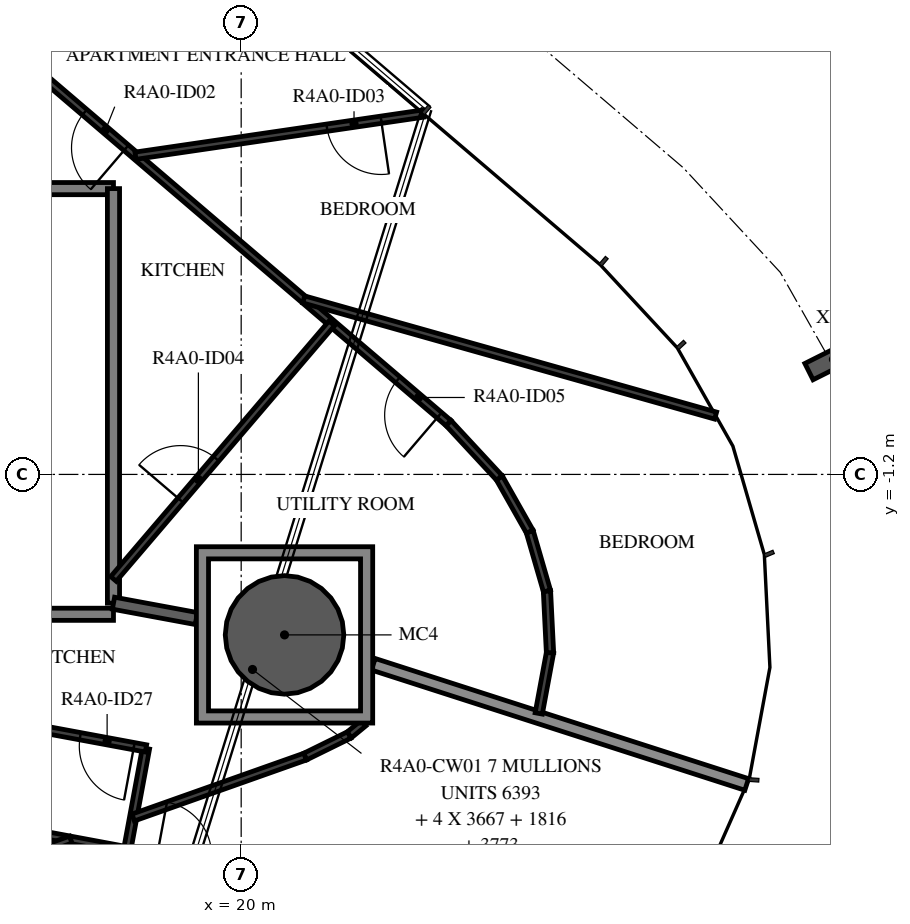
"""IFC4 building model, lengths in metres.
Left out: names, types, materials, properties, quantities, classifications, styles, units other than length and angle.
Written with IfcOpenShell. Run it as: python <this file> out.ifc"""

import sys

from ifc_helpers import new_model, si_unit, direction, frame, frame_2d, origin, origin_2d, place, context, subcontext, project, spatial, polyline, rectangle, hollow_circle, i_section, outline, extrude, element, fill, save


model = new_model("IFC4")
c1 = context("Model", 3, precision=1e-05, world=origin(), true_north=direction((0.0, 1.0)))
c2 = subcontext(c1, "Body", "Model", "MODEL_VIEW")
j1 = project(units=[si_unit("LENGTHUNIT", "METRE"), si_unit("PLANEANGLEUNIT", "RADIAN")], contexts=[c1])
p1 = place(None, origin())
s1 = spatial("IfcSite", under=j1, at=p1, CompositionType="ELEMENT")
p2 = place(p1, origin())
s2 = spatial("IfcBuilding", under=s1, at=p2, CompositionType="ELEMENT")
p3 = place(p2, frame((0.0, 0.0, 158.7)))
s3 = spatial("IfcBuildingStorey", under=s2, at=p3, CompositionType="ELEMENT", Elevation=158.7)
p4 = place(p3, frame((20.713, -3.839, -0.38), z_axis=(0.0, 0.0, 1.0), x_axis=(1.0, 0.0, 0.0)))
e1 = element("IfcColumn", 1, at=p4, inside=s3, PredefinedType="COLUMN", context=c2, shape_type="SweptSolid", body=[
    extrude(hollow_circle(Radius=0.975, WallThickness=0.045, at=origin_2d()), origin(), (0.0, 0.0, 1.0), 3.5),
])
p5 = place(p3, frame((29.74, 0.692, -0.38), z_axis=(0.0, 0.0, 1.0), x_axis=(0.448657012727, -0.893704025352, 0.0)))
e2 = element("IfcColumn", 2, at=p5, inside=s3, PredefinedType="COLUMN", context=c2, shape_type="SweptSolid", body=[
    extrude(i_section(OverallWidth=0.3, OverallDepth=0.9, WebThickness=0.019, FlangeThickness=0.035, FilletRadius=0.03, at=origin_2d()), origin(), (0.0, 0.0, 1.0), 3.5),
])
p6 = place(p3, frame((17.9, 3.5, 0.0), z_axis=(0.0, 0.0, 1.0), x_axis=(-1.0, 0.0, 0.0)))
e3 = element("IfcWall", 3, at=p6, inside=s3, PredefinedType="STANDARD", context=c2, shape_type="SweptSolid", body=[
    extrude(rectangle(XDim=4.924, YDim=0.2, at=frame_2d((2.462, 0.0))), origin(), (0.0, 0.0, 1.0), 3.12),
])
p7 = place(p3, frame((17.9, -3.318, 0.0), z_axis=(0.0, 0.0, 1.0), x_axis=(0.0, 1.0, 0.0)))
e4 = element("IfcWall", 4, at=p7, inside=s3, PredefinedType="STANDARD", context=c2, shape_type="SweptSolid", body=[
    extrude(rectangle(XDim=6.818, YDim=0.2, at=frame_2d((3.409, 0.0))), origin(), (0.0, 0.0, 1.0), 3.12),
])
p8 = place(p3, frame((12.979, -3.5, 0.0), z_axis=(0.0, 0.0, 1.0), x_axis=(1.0, 0.0, 0.0)))
e5 = element("IfcWall", 5, at=p8, inside=s3, PredefinedType="STANDARD", context=c2, shape_type="SweptSolid", body=[
    extrude(rectangle(XDim=4.92, YDim=0.2, at=frame_2d((2.46, 0.0))), origin(), (0.0, 0.0, 1.0), 3.12),
])
p9 = place(p3, frame((22.173, -4.322, 0.0), z_axis=(0.0, 0.0, 1.0), x_axis=(0.951906405572, -0.306388960362, 0.0)))
e6 = element("IfcWall", 6, at=p9, inside=s3, PredefinedType="STANDARD", context=c2, shape_type="SweptSolid", body=[
    extrude(rectangle(XDim=6.45, YDim=0.2, at=frame_2d((3.225, 0.0))), origin(), (0.0, 0.0, 1.0), 2.73),
])
p10 = place(p3, frame((17.9, -3.318, 0.0), z_axis=(0.0, 0.0, 1.0), x_axis=(0.983252800712, -0.182246892682, 0.0)))
e7 = element("IfcWall", 7, at=p10, inside=s3, PredefinedType="STANDARD", context=c2, shape_type="SweptSolid", body=[
    extrude(rectangle(XDim=1.386, YDim=0.2, at=frame_2d((0.693, 0.0))), origin(), (0.0, 0.0, 1.0), 3.12),
])
p11 = place(p3, frame((23.411, -0.357, 0.0), z_axis=(0.0, 0.0, 1.0), x_axis=(-0.76041871148, 0.649433124525, 0.0)))
e8 = element("IfcWall", 8, at=p11, inside=s3, PredefinedType="PARTITIONING", context=c2, shape_type="SweptSolid", body=[
    extrude(rectangle(XDim=9.259, YDim=0.12, at=frame_2d((4.629, 0.0))), origin(), (0.0, 0.0, 1.0), 3.12),
])
p12 = place(p11, frame((6.972, 0.0, 0.0)))
e9 = element("IfcOpeningElement", 9, at=p12, cuts=e8, PredefinedType="OPENING", context=c2, shape_type="SweptSolid", body=[
    extrude(rectangle(XDim=0.9, YDim=2.1, at=frame_2d((0.45, 1.05))), frame((0.0, 0.07, 0.0), z_axis=(0.0, -1.0, 0.0), x_axis=(1.0, 0.0, 0.0)), (0.0, 0.0, 1.0), 0.14),
])
p13 = place(p11, frame((0.2, 0.0, 0.0)))
e10 = element("IfcOpeningElement", 10, at=p13, cuts=e8, PredefinedType="OPENING", context=c2, shape_type="SweptSolid", body=[
    extrude(rectangle(XDim=0.9, YDim=2.1, at=frame_2d((0.45, 1.05))), frame((0.0, 0.07, 0.0), z_axis=(0.0, -1.0, 0.0), x_axis=(1.0, 0.0, 0.0)), (0.0, 0.0, 1.0), 0.14),
])
p14 = place(p3, frame((17.9, -2.918, 0.0), z_axis=(0.0, 0.0, 1.0), x_axis=(0.649469887983, 0.760387312232, 0.0)))
e11 = element("IfcWall", 11, at=p14, inside=s3, PredefinedType="PARTITIONING", context=c2, shape_type="SweptSolid", body=[
    extrude(rectangle(XDim=5.527, YDim=0.12, at=frame_2d((2.763, 0.0))), origin(), (0.0, 0.0, 1.0), 3.12),
])
p15 = place(p14, frame((1.7, 0.0, 0.0)))
e12 = element("IfcOpeningElement", 12, at=p15, cuts=e11, PredefinedType="OPENING", context=c2, shape_type="SweptSolid", body=[
    extrude(rectangle(XDim=0.9, YDim=2.1, at=frame_2d((0.45, 1.05))), frame((0.0, 0.07, 0.0), z_axis=(0.0, -1.0, 0.0), x_axis=(1.0, 0.0, 0.0)), (0.0, 0.0, 1.0), 0.14),
])
p16 = place(p3, frame((22.994, 4.734, 0.0), z_axis=(0.0, 0.0, 1.0), x_axis=(-0.989449286977, -0.144879634529, 0.0)))
e13 = element("IfcWall", 13, at=p16, inside=s3, PredefinedType="PARTITIONING", context=c2, shape_type="SweptSolid", body=[
    extrude(rectangle(XDim=4.782, YDim=0.12, at=frame_2d((2.391, 0.0))), origin(), (0.0, 0.0, 1.0), 3.12),
])
p17 = place(p16, frame((0.7, 0.0, 0.0)))
e14 = element("IfcOpeningElement", 14, at=p17, cuts=e13, PredefinedType="OPENING", context=c2, shape_type="SweptSolid", body=[
    extrude(rectangle(XDim=0.9, YDim=2.1, at=frame_2d((0.45, 1.05))), frame((0.0, 0.07, 0.0), z_axis=(0.0, -1.0, 0.0), x_axis=(1.0, 0.0, 0.0)), (0.0, 0.0, 1.0), 0.14),
])
p18 = place(p3, frame((21.029, 1.677, 0.0), z_axis=(0.0, 0.0, 1.0), x_axis=(0.962458274539, -0.271429677396, 0.0)))
e15 = element("IfcWall", 15, at=p18, inside=s3, PredefinedType="PARTITIONING", context=c2, shape_type="SweptSolid", body=[
    extrude(rectangle(XDim=7.037, YDim=0.12, at=frame_2d((3.519, 0.0))), origin(), (0.0, 0.0, 1.0), 3.12),
])
for number, where, z_axis, x_axis in (
    (16, (24.894, -5.131, 0.0), (0.0, 0.0, 1.0), (0.182, 0.983, 0.0)),
    (17, (25.079, -4.132, 0.0), (0.0, 0.0, 1.0), (-0.049, 0.999, 0.0)),
):
    element("IfcWall", number, at=place(p3, frame(where, z_axis=z_axis, x_axis=x_axis)), inside=s3, PredefinedType="PARTITIONING", context=c2, shape_type="SweptSolid", body=[
        extrude(rectangle(XDim=1.016, YDim=0.12, at=frame_2d((0.508, 0.0))), origin(), (0.0, 0.0, 1.0), 3.12),
    ])
for number, where, z_axis, x_axis in (
    (18, (25.029, -3.117, 0.0), (0.0, 0.0, 1.0), (-0.279, 0.96, 0.0)),
    (19, (24.746, -2.141, 0.0), (0.0, 0.0, 1.0), (-0.492, 0.87, 0.0)),
):
    element("IfcWall", number, at=place(p3, frame(where, z_axis=z_axis, x_axis=x_axis)), inside=s3, PredefinedType="PARTITIONING", context=c2, shape_type="SweptSolid", body=[
        extrude(rectangle(XDim=1.016, YDim=0.12, at=frame_2d((0.508, 0.0))), origin(), (0.0, 0.0, 1.0), 3.12),
    ])
p19 = place(p3, frame((24.246, -1.257, 0.0), z_axis=(0.0, 0.0, 1.0), x_axis=(-0.679840361176, 0.733360132074, 0.0)))
e20 = element("IfcWall", 20, at=p19, inside=s3, PredefinedType="PARTITIONING", context=c2, shape_type="SweptSolid", body=[
    extrude(rectangle(XDim=1.227, YDim=0.12, at=frame_2d((0.614, 0.0))), origin(), (0.0, 0.0, 1.0), 3.12),
])
p20 = place(p3, frame((13.93, -6.6, 0.0), z_axis=(0.0, 0.0, 1.0), x_axis=(0.983034896283, -0.183418626887, 0.0)))
e21 = element("IfcWall", 21, at=p20, inside=s3, PredefinedType="PARTITIONING", context=c2, shape_type="SweptSolid", body=[
    extrude(rectangle(XDim=13.066, YDim=0.12, at=frame_2d((6.533, 0.0))), origin(), (0.0, 0.0, 1.0), 3.12),
])
p21 = place(p20, frame((4.766, 0.0, 0.0)))
e22 = element("IfcOpeningElement", 22, at=p21, cuts=e21, PredefinedType="OPENING", context=c2, shape_type="SweptSolid", body=[
    extrude(rectangle(XDim=0.9, YDim=2.1, at=frame_2d((0.45, 1.05))), frame((0.0, 0.07, 0.0), z_axis=(0.0, -1.0, 0.0), x_axis=(1.0, 0.0, 0.0)), (0.0, 0.0, 1.0), 0.14),
])
p22 = place(p3, frame((18.125, -7.377, 0.0), z_axis=(0.0, 0.0, 1.0), x_axis=(0.182233242958, 0.983255330604, 0.0)))
e23 = element("IfcWall", 23, at=p22, inside=s3, PredefinedType="PARTITIONING", context=c2, shape_type="SweptSolid", body=[
    extrude(rectangle(XDim=1.7, YDim=0.12, at=frame_2d((0.85, 0.0))), origin(), (0.0, 0.0, 1.0), 3.12),
])
p23 = place(p3, frame((18.435, -5.706, 0.0), z_axis=(0.0, 0.0, 1.0), x_axis=(-0.983256187302, 0.18222862051, 0.0)))
e24 = element("IfcWall", 24, at=p23, inside=s3, PredefinedType="PARTITIONING", context=c2, shape_type="SweptSolid", body=[
    extrude(rectangle(XDim=4.266, YDim=0.12, at=frame_2d((2.133, 0.0))), origin(), (0.0, 0.0, 1.0), 3.12),
])
p24 = place(p23, frame((0.2, 0.0, 0.0)))
e25 = element("IfcOpeningElement", 25, at=p24, cuts=e24, PredefinedType="OPENING", context=c2, shape_type="SweptSolid", body=[
    extrude(rectangle(XDim=0.9, YDim=2.1, at=frame_2d((0.45, 1.05))), frame((0.0, 0.07, 0.0), z_axis=(0.0, -1.0, 0.0), x_axis=(1.0, 0.0, 0.0)), (0.0, 0.0, 1.0), 0.14),
])
p25 = place(p3, frame((17.198, -7.206, 0.0), z_axis=(0.0, 0.0, 1.0), x_axis=(-0.942639551003, -0.333812337826, 0.0)))
e26 = element("IfcWall", 26, at=p25, inside=s3, PredefinedType="PARTITIONING", context=c2, shape_type="SweptSolid", body=[
    extrude(rectangle(XDim=5.713, YDim=0.12, at=frame_2d((2.857, 0.0))), origin(), (0.0, 0.0, 1.0), 3.12),
])
p26 = place(p3, frame((22.013, -5.289, 0.0), z_axis=(0.0, 0.0, 1.0), x_axis=(-0.771907381926, -0.635735002755, 0.0)))
e27 = element("IfcWall", 27, at=p26, inside=s3, PredefinedType="PARTITIONING", context=c2, shape_type="SweptSolid", body=[
    extrude(rectangle(XDim=0.308, YDim=0.12, at=frame_2d((0.154, 0.0))), origin(), (0.0, 0.0, 1.0), 3.12),
])
p27 = place(p3, frame((21.775, -5.485, 0.0), z_axis=(0.0, 0.0, 1.0), x_axis=(-0.897493373385, -0.441027940986, 0.0)))
e28 = element("IfcWall", 28, at=p27, inside=s3, PredefinedType="PARTITIONING", context=c2, shape_type="SweptSolid", body=[
    extrude(rectangle(XDim=0.807, YDim=0.12, at=frame_2d((0.403, 0.0))), origin(), (0.0, 0.0, 1.0), 3.12),
])
p28 = place(p3, frame((21.052, -5.841, 0.0), z_axis=(0.0, 0.0, 1.0), x_axis=(-0.94262615799, -0.33385015542, 0.0)))
e29 = element("IfcWall", 29, at=p28, inside=s3, PredefinedType="PARTITIONING", context=c2, shape_type="SweptSolid", body=[
    extrude(rectangle(XDim=3.0, YDim=0.12, at=frame_2d((1.5, 0.0))), origin(), (0.0, 0.0, 1.0), 3.12),
])
p29 = place(p3, origin())
e30 = element("IfcWall", 30, at=p29, inside=s3, PredefinedType="STANDARD", context=c2, shape_type="SweptSolid", body=[
    extrude(outline(polyline([(22.163, -2.389), (22.163, -5.289), (19.263, -5.289), (19.263, -2.389), (22.163, -2.389)]), holes=[polyline([(19.463, -5.089), (21.963, -5.089), (21.963, -2.589), (19.463, -2.589), (19.463, -5.089)])]), origin(), (0.0, 0.0, 1.0), 3.12),
])
p30 = place(p12, origin())
e31 = element("IfcDoor", 31, at=p30, inside=s3, OperationType="SINGLE_SWING_RIGHT", PredefinedType="DOOR", context=c2, shape_type="SweptSolid", body=[
    extrude(rectangle(XDim=0.9, YDim=2.1, at=frame_2d((0.45, 1.05))), frame((0.0, 0.025, 0.0), z_axis=(0.0, -1.0, 0.0), x_axis=(1.0, 0.0, 0.0)), (0.0, 0.0, 1.0), 0.05),
])
fill(e9, e31)
p31 = place(p17, origin())
e32 = element("IfcDoor", 32, at=p31, inside=s3, OperationType="SINGLE_SWING_LEFT", PredefinedType="DOOR", context=c2, shape_type="SweptSolid", body=[
    extrude(rectangle(XDim=0.9, YDim=2.1, at=frame_2d((0.45, 1.05))), frame((0.0, 0.025, 0.0), z_axis=(0.0, -1.0, 0.0), x_axis=(1.0, 0.0, 0.0)), (0.0, 0.0, 1.0), 0.05),
])
fill(e14, e32)
p32 = place(p15, origin())
e33 = element("IfcDoor", 33, at=p32, inside=s3, OperationType="SINGLE_SWING_LEFT", PredefinedType="DOOR", context=c2, shape_type="SweptSolid", body=[
    extrude(rectangle(XDim=0.9, YDim=2.1, at=frame_2d((0.45, 1.05))), frame((0.0, 0.025, 0.0), z_axis=(0.0, -1.0, 0.0), x_axis=(1.0, 0.0, 0.0)), (0.0, 0.0, 1.0), 0.05),
])
fill(e12, e33)
p33 = place(p13, origin())
e34 = element("IfcDoor", 34, at=p33, inside=s3, OperationType="SINGLE_SWING_LEFT", PredefinedType="DOOR", context=c2, shape_type="SweptSolid", body=[
    extrude(rectangle(XDim=0.9, YDim=2.1, at=frame_2d((0.45, 1.05))), frame((0.0, 0.025, 0.0), z_axis=(0.0, -1.0, 0.0), x_axis=(1.0, 0.0, 0.0)), (0.0, 0.0, 1.0), 0.05),
])
fill(e10, e34)
p34 = place(p24, origin())
e35 = element("IfcDoor", 35, at=p34, inside=s3, OperationType="SINGLE_SWING_LEFT", PredefinedType="DOOR", context=c2, shape_type="SweptSolid", body=[
    extrude(rectangle(XDim=0.9, YDim=2.1, at=frame_2d((0.45, 1.05))), frame((0.0, 0.025, 0.0), z_axis=(0.0, -1.0, 0.0), x_axis=(1.0, 0.0, 0.0)), (0.0, 0.0, 1.0), 0.05),
])
fill(e25, e35)
save(model, sys.argv[1])
